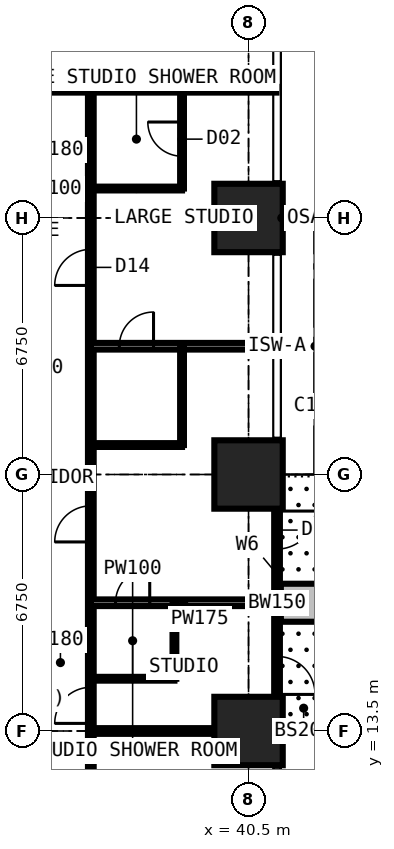
"""IFC4 building model, lengths in metres.
Left out: names, types, materials, properties, quantities, classifications, styles, units other than length and angle.
Written with IfcOpenShell. Run it as: python <this file> out.ifc"""

import sys

from ifc_helpers import new_model, si_unit, direction, frame, frame_2d, origin, origin_2d, place, context, subcontext, project, spatial, rectangle, extrude, element, fill, save


model = new_model("IFC4")
c1 = context("Model", 3, precision=1e-05, world=origin(), true_north=direction((0.0, 1.0)))
c2 = subcontext(c1, "Body", "Model", "MODEL_VIEW")
j1 = project(units=[si_unit("LENGTHUNIT", "METRE"), si_unit("PLANEANGLEUNIT", "RADIAN")], contexts=[c1])
p1 = place(None, origin())
s1 = spatial("IfcSite", under=j1, at=p1, CompositionType="ELEMENT")
p2 = place(p1, origin())
s2 = spatial("IfcBuilding", under=s1, at=p2, CompositionType="ELEMENT")
p3 = place(p2, frame((0.0, 0.0, 54.0)))
s3 = spatial("IfcBuildingStorey", under=s2, at=p3, CompositionType="ELEMENT", Elevation=54.0)
for number, where, z_axis, x_axis in (
    (1, (40.5, 13.5, 0.0), (0.0, 0.0, 1.0), (1.0, 0.0, 0.0)),
    (2, (40.5, 20.25, 0.0), (0.0, 0.0, 1.0), (1.0, 0.0, 0.0)),
    (3, (40.5, 27.0, 0.0), (0.0, 0.0, 1.0), (1.0, 0.0, 0.0)),
):
    element("IfcColumn", number, at=place(p3, frame(where, z_axis=z_axis, x_axis=x_axis)), inside=s3, PredefinedType="COLUMN", context=c2, shape_type="SweptSolid", body=[
        extrude(rectangle(XDim=1.8, YDim=1.8, at=origin_2d()), origin(), (0.0, 0.0, 1.0), 3.6),
    ])
p4 = place(p3, frame((41.25, 20.25, 0.0), z_axis=(0.0, 0.0, 1.0), x_axis=(0.0, -1.0, 0.0)))
e4 = element("IfcWall", 4, at=p4, inside=s3, PredefinedType="SOLIDWALL", context=c2, shape_type="SweptSolid", body=[
    extrude(rectangle(XDim=6.75, YDim=0.15, at=frame_2d((3.375, 0.0))), origin(), (0.0, 0.0, 1.0), 3.375),
])
p5 = place(p4, frame((0.962, 0.0, 0.0)))
e5 = element("IfcOpeningElement", 5, at=p5, cuts=e4, PredefinedType="OPENING", context=c2, shape_type="SweptSolid", body=[
    extrude(rectangle(XDim=1.0, YDim=2.2, at=frame_2d((0.5, 1.1))), frame((0.0, 0.085, 0.0), z_axis=(0.0, -1.0, 0.0), x_axis=(1.0, 0.0, 0.0)), (0.0, 0.0, 1.0), 0.17),
])
p6 = place(p4, frame((2.025, 0.0, 0.9)))
e6 = element("IfcOpeningElement", 6, at=p6, cuts=e4, PredefinedType="OPENING", context=c2, shape_type="SweptSolid", body=[
    extrude(rectangle(XDim=1.2, YDim=1.8, at=frame_2d((0.6, 0.9))), frame((0.0, 0.085, 0.0), z_axis=(0.0, -1.0, 0.0), x_axis=(1.0, 0.0, 0.0)), (0.0, 0.0, 1.0), 0.17),
])
p7 = place(p4, frame((4.788, 0.0, 0.0)))
e7 = element("IfcOpeningElement", 7, at=p7, cuts=e4, PredefinedType="OPENING", context=c2, shape_type="SweptSolid", body=[
    extrude(rectangle(XDim=1.0, YDim=2.2, at=frame_2d((0.5, 1.1))), frame((0.0, 0.085, 0.0), z_axis=(0.0, -1.0, 0.0), x_axis=(1.0, 0.0, 0.0)), (0.0, 0.0, 1.0), 0.17),
])
p8 = place(p4, frame((3.525, 0.0, 0.9)))
e8 = element("IfcOpeningElement", 8, at=p8, cuts=e4, PredefinedType="OPENING", context=c2, shape_type="SweptSolid", body=[
    extrude(rectangle(XDim=1.2, YDim=1.8, at=frame_2d((0.6, 0.9))), frame((0.0, 0.085, 0.0), z_axis=(0.0, -1.0, 0.0), x_axis=(1.0, 0.0, 0.0)), (0.0, 0.0, 1.0), 0.17),
])
p9 = place(p3, frame((41.35, 16.875, 0.0), z_axis=(0.0, 0.0, 1.0), x_axis=(1.0, 0.0, 0.0)))
e9 = element("IfcWall", 9, at=p9, inside=s3, PredefinedType="USERDEFINED", context=c2, shape_type="SweptSolid", body=[
    extrude(rectangle(XDim=2.2, YDim=1.0, at=frame_2d((1.1, 0.0))), origin(), (0.0, 0.0, 1.0), 0.9),
])
p10 = place(p3, frame((30.375, 30.375, 0.0), z_axis=(0.0, 0.0, 1.0), x_axis=(1.0, 0.0, 0.0)))
e10 = element("IfcWall", 10, at=p10, inside=s3, PredefinedType="PARTITIONING", context=c2, shape_type="SweptSolid", body=[
    extrude(rectangle(XDim=10.859, YDim=0.15, at=frame_2d((5.429, 0.0))), origin(), (0.0, 0.0, 1.0), 3.375),
])
p11 = place(p3, frame((36.35, 6.75, 0.0), z_axis=(0.0, 0.0, 1.0), x_axis=(0.0, 1.0, 0.0)))
e11 = element("IfcWall", 11, at=p11, inside=s3, PredefinedType="PARTITIONING", context=c2, shape_type="SweptSolid", body=[
    extrude(rectangle(XDim=23.625, YDim=0.15, at=frame_2d((11.812, 0.0))), origin(), (0.0, 0.0, 1.0), 3.375),
])
p12 = place(p11, frame((18.475, 0.0, 0.0)))
e12 = element("IfcOpeningElement", 12, at=p12, cuts=e11, PredefinedType="OPENING", context=c2, shape_type="SweptSolid", body=[
    extrude(rectangle(XDim=0.95, YDim=2.2, at=frame_2d((0.475, 1.1))), frame((0.0, 0.085, 0.0), z_axis=(0.0, -1.0, 0.0), x_axis=(1.0, 0.0, 0.0)), (0.0, 0.0, 1.0), 0.17),
])
p13 = place(p11, frame((11.725, 0.0, 0.0)))
e13 = element("IfcOpeningElement", 13, at=p13, cuts=e11, PredefinedType="OPENING", context=c2, shape_type="SweptSolid", body=[
    extrude(rectangle(XDim=0.95, YDim=2.2, at=frame_2d((0.475, 1.1))), frame((0.0, 0.085, 0.0), z_axis=(0.0, -1.0, 0.0), x_axis=(1.0, 0.0, 0.0)), (0.0, 0.0, 1.0), 0.17),
])
p14 = place(p11, frame((6.95, 0.0, 0.0)))
e14 = element("IfcOpeningElement", 14, at=p14, cuts=e11, PredefinedType="OPENING", context=c2, shape_type="SweptSolid", body=[
    extrude(rectangle(XDim=0.95, YDim=2.2, at=frame_2d((0.475, 1.1))), frame((0.0, 0.085, 0.0), z_axis=(0.0, -1.0, 0.0), x_axis=(1.0, 0.0, 0.0)), (0.0, 0.0, 1.0), 0.17),
])
p15 = place(p3, frame((36.35, 13.5, 0.0), z_axis=(0.0, 0.0, 1.0), x_axis=(1.0, 0.0, 0.0)))
e15 = element("IfcWall", 15, at=p15, inside=s3, PredefinedType="PARTITIONING", context=c2, shape_type="SweptSolid", body=[
    extrude(rectangle(XDim=4.884, YDim=0.15, at=frame_2d((2.442, 0.0))), origin(), (0.0, 0.0, 1.0), 2.877),
])
p16 = place(p3, frame((36.35, 14.875, 0.0), z_axis=(0.0, 0.0, 1.0), x_axis=(1.0, 0.0, 0.0)))
e16 = element("IfcWall", 16, at=p16, inside=s3, PredefinedType="PARTITIONING", context=c2, shape_type="SweptSolid", body=[
    extrude(rectangle(XDim=2.2, YDim=0.1, at=frame_2d((1.1, 0.0))), origin(), (0.0, 0.0, 1.0), 3.375),
])
p17 = place(p3, frame((36.35, 16.875, 0.0), z_axis=(0.0, 0.0, 1.0), x_axis=(1.0, 0.0, 0.0)))
e17 = element("IfcWall", 17, at=p17, inside=s3, PredefinedType="PARTITIONING", context=c2, shape_type="SweptSolid", body=[
    extrude(rectangle(XDim=4.884, YDim=0.175, at=frame_2d((2.442, 0.0))), origin(), (0.0, 0.0, 1.0), 3.375),
])
p18 = place(p17, frame((0.65, 0.0, 0.0)))
e18 = element("IfcOpeningElement", 18, at=p18, cuts=e17, PredefinedType="OPENING", context=c2, shape_type="SweptSolid", body=[
    extrude(rectangle(XDim=0.9, YDim=2.2, at=frame_2d((0.45, 1.1))), frame((0.0, 0.097, 0.0), z_axis=(0.0, -1.0, 0.0), x_axis=(1.0, 0.0, 0.0)), (0.0, 0.0, 1.0), 0.195),
])
p19 = place(p3, frame((36.35, 21.025, 0.0), z_axis=(0.0, 0.0, 1.0), x_axis=(1.0, 0.0, 0.0)))
e19 = element("IfcWall", 19, at=p19, inside=s3, PredefinedType="PARTITIONING", context=c2, shape_type="SweptSolid", body=[
    extrude(rectangle(XDim=2.4, YDim=0.1, at=frame_2d((1.2, 0.0))), origin(), (0.0, 0.0, 1.0), 3.375),
])
p20 = place(p3, frame((36.35, 23.625, 0.0), z_axis=(0.0, 0.0, 1.0), x_axis=(1.0, 0.0, 0.0)))
e20 = element("IfcWall", 20, at=p20, inside=s3, PredefinedType="PARTITIONING", context=c2, shape_type="SweptSolid", body=[
    extrude(rectangle(XDim=4.884, YDim=0.175, at=frame_2d((2.442, 0.0))), origin(), (0.0, 0.0, 1.0), 3.375),
])
p21 = place(p20, frame((0.75, 0.0, 0.0)))
e21 = element("IfcOpeningElement", 21, at=p21, cuts=e20, PredefinedType="OPENING", context=c2, shape_type="SweptSolid", body=[
    extrude(rectangle(XDim=0.9, YDim=2.2, at=frame_2d((0.45, 1.1))), frame((0.0, 0.097, 0.0), z_axis=(0.0, -1.0, 0.0), x_axis=(1.0, 0.0, 0.0)), (0.0, 0.0, 1.0), 0.195),
])
p22 = place(p3, frame((36.35, 27.775, 0.0), z_axis=(0.0, 0.0, 1.0), x_axis=(1.0, 0.0, 0.0)))
e22 = element("IfcWall", 22, at=p22, inside=s3, PredefinedType="PARTITIONING", context=c2, shape_type="SweptSolid", body=[
    extrude(rectangle(XDim=2.4, YDim=0.1, at=frame_2d((1.2, 0.0))), origin(), (0.0, 0.0, 1.0), 3.375),
])
p23 = place(p3, frame((38.55, 14.875, 0.0), z_axis=(0.0, 0.0, 1.0), x_axis=(0.0, 1.0, 0.0)))
e23 = element("IfcWall", 23, at=p23, inside=s3, PredefinedType="PARTITIONING", context=c2, shape_type="SweptSolid", body=[
    extrude(rectangle(XDim=2.0, YDim=0.1, at=frame_2d((1.0, 0.0))), origin(), (0.0, 0.0, 1.0), 3.375),
])
p24 = place(p3, frame((38.75, 21.025, 0.0), z_axis=(0.0, 0.0, 1.0), x_axis=(0.0, 1.0, 0.0)))
e24 = element("IfcWall", 24, at=p24, inside=s3, PredefinedType="PARTITIONING", context=c2, shape_type="SweptSolid", body=[
    extrude(rectangle(XDim=2.6, YDim=0.1, at=frame_2d((1.3, 0.0))), origin(), (0.0, 0.0, 1.0), 3.375),
])
p25 = place(p3, frame((38.75, 27.775, 0.0), z_axis=(0.0, 0.0, 1.0), x_axis=(0.0, 1.0, 0.0)))
e25 = element("IfcWall", 25, at=p25, inside=s3, PredefinedType="PARTITIONING", context=c2, shape_type="SweptSolid", body=[
    extrude(rectangle(XDim=2.6, YDim=0.1, at=frame_2d((1.3, 0.0))), origin(), (0.0, 0.0, 1.0), 3.375),
])
p26 = place(p25, frame((0.85, 0.0, 0.0)))
e26 = element("IfcOpeningElement", 26, at=p26, cuts=e25, PredefinedType="OPENING", context=c2, shape_type="SweptSolid", body=[
    extrude(rectangle(XDim=0.9, YDim=2.2, at=frame_2d((0.45, 1.1))), frame((0.0, 0.06, 0.0), z_axis=(0.0, -1.0, 0.0), x_axis=(1.0, 0.0, 0.0)), (0.0, 0.0, 1.0), 0.12),
])
p27 = place(p5, origin())
e27 = element("IfcDoor", 27, at=p27, inside=s3, OperationType="SINGLE_SWING_LEFT", PredefinedType="DOOR", context=c2, shape_type="SweptSolid", body=[
    extrude(rectangle(XDim=1.0, YDim=2.2, at=frame_2d((0.5, 1.1))), frame((0.0, 0.025, 0.0), z_axis=(0.0, -1.0, 0.0), x_axis=(1.0, 0.0, 0.0)), (0.0, 0.0, 1.0), 0.05),
])
fill(e5, e27)
p28 = place(p6, origin())
e28 = element("IfcWindow", 28, at=p28, inside=s3, PartitioningType="SINGLE_PANEL", PredefinedType="WINDOW", context=c2, shape_type="SweptSolid", body=[
    extrude(rectangle(XDim=1.2, YDim=1.8, at=frame_2d((0.6, 0.9))), frame((0.0, 0.03, 0.0), z_axis=(0.0, -1.0, 0.0), x_axis=(1.0, 0.0, 0.0)), (0.0, 0.0, 1.0), 0.06),
])
fill(e6, e28)
p29 = place(p7, origin())
e29 = element("IfcDoor", 29, at=p29, inside=s3, OperationType="SINGLE_SWING_RIGHT", PredefinedType="DOOR", context=c2, shape_type="SweptSolid", body=[
    extrude(rectangle(XDim=1.0, YDim=2.2, at=frame_2d((0.5, 1.1))), frame((0.0, 0.025, 0.0), z_axis=(0.0, -1.0, 0.0), x_axis=(1.0, 0.0, 0.0)), (0.0, 0.0, 1.0), 0.05),
])
fill(e7, e29)
p30 = place(p8, origin())
e30 = element("IfcWindow", 30, at=p30, inside=s3, PartitioningType="SINGLE_PANEL", PredefinedType="WINDOW", context=c2, shape_type="SweptSolid", body=[
    extrude(rectangle(XDim=1.2, YDim=1.8, at=frame_2d((0.6, 0.9))), frame((0.0, 0.03, 0.0), z_axis=(0.0, -1.0, 0.0), x_axis=(1.0, 0.0, 0.0)), (0.0, 0.0, 1.0), 0.06),
])
fill(e8, e30)
p31 = place(p12, origin())
e31 = element("IfcDoor", 31, at=p31, inside=s3, OperationType="SINGLE_SWING_LEFT", PredefinedType="DOOR", context=c2, shape_type="SweptSolid", body=[
    extrude(rectangle(XDim=0.95, YDim=2.2, at=frame_2d((0.475, 1.1))), frame((0.0, 0.025, 0.0), z_axis=(0.0, -1.0, 0.0), x_axis=(1.0, 0.0, 0.0)), (0.0, 0.0, 1.0), 0.05),
])
fill(e12, e31)
p32 = place(p26, origin())
e32 = element("IfcDoor", 32, at=p32, inside=s3, OperationType="SINGLE_SWING_RIGHT", PredefinedType="DOOR", context=c2, shape_type="SweptSolid", body=[
    extrude(rectangle(XDim=0.9, YDim=2.2, at=frame_2d((0.45, 1.1))), frame((0.0, 0.025, 0.0), z_axis=(0.0, -1.0, 0.0), x_axis=(1.0, 0.0, 0.0)), (0.0, 0.0, 1.0), 0.05),
])
fill(e26, e32)
p33 = place(p13, origin())
e33 = element("IfcDoor", 33, at=p33, inside=s3, OperationType="SINGLE_SWING_LEFT", PredefinedType="DOOR", context=c2, shape_type="SweptSolid", body=[
    extrude(rectangle(XDim=0.95, YDim=2.2, at=frame_2d((0.475, 1.1))), frame((0.0, 0.025, 0.0), z_axis=(0.0, -1.0, 0.0), x_axis=(1.0, 0.0, 0.0)), (0.0, 0.0, 1.0), 0.05),
])
fill(e13, e33)
p34 = place(p21, origin())
e34 = element("IfcDoor", 34, at=p34, inside=s3, OperationType="SINGLE_SWING_RIGHT", PredefinedType="DOOR", context=c2, shape_type="SweptSolid", body=[
    extrude(rectangle(XDim=0.9, YDim=2.2, at=frame_2d((0.45, 1.1))), frame((0.0, 0.025, 0.0), z_axis=(0.0, -1.0, 0.0), x_axis=(1.0, 0.0, 0.0)), (0.0, 0.0, 1.0), 0.05),
])
fill(e21, e34)
p35 = place(p14, origin())
e35 = element("IfcDoor", 35, at=p35, inside=s3, OperationType="SINGLE_SWING_LEFT", PredefinedType="DOOR", context=c2, shape_type="SweptSolid", body=[
    extrude(rectangle(XDim=0.95, YDim=2.2, at=frame_2d((0.475, 1.1))), frame((0.0, 0.025, 0.0), z_axis=(0.0, -1.0, 0.0), x_axis=(1.0, 0.0, 0.0)), (0.0, 0.0, 1.0), 0.05),
])
fill(e14, e35)
p36 = place(p18, origin())
e36 = element("IfcDoor", 36, at=p36, inside=s3, OperationType="SINGLE_SWING_RIGHT", PredefinedType="DOOR", context=c2, shape_type="SweptSolid", body=[
    extrude(rectangle(XDim=0.9, YDim=2.2, at=frame_2d((0.45, 1.1))), frame((0.0, 0.025, 0.0), z_axis=(0.0, -1.0, 0.0), x_axis=(1.0, 0.0, 0.0)), (0.0, 0.0, 1.0), 0.05),
])
fill(e18, e36)
save(model, sys.argv[1])
